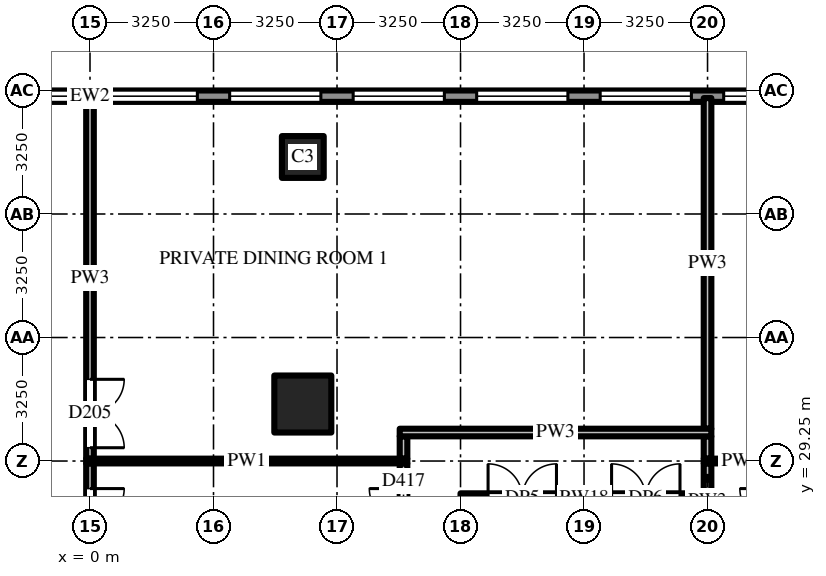
"""IFC4 building model, lengths in metres.
Left out: names, types, materials, properties, quantities, classifications, styles, units other than length and angle.
Written with IfcOpenShell. Run it as: python <this file> out.ifc"""

import sys

from ifc_helpers import new_model, si_unit, direction, frame, frame_2d, origin, origin_2d, place, context, subcontext, project, spatial, rectangle, extrude, source, transform, mapped, element, fill, save


model = new_model("IFC4")
c1 = context("Model", 3, precision=1e-05, world=origin(), true_north=direction((0.0, 1.0)))
c2 = subcontext(c1, "Body", "Model", "MODEL_VIEW")
j1 = project(units=[si_unit("LENGTHUNIT", "METRE"), si_unit("PLANEANGLEUNIT", "RADIAN")], contexts=[c1])
p1 = place(None, origin())
s1 = spatial("IfcSite", under=j1, at=p1, CompositionType="ELEMENT")
p2 = place(p1, origin())
s2 = spatial("IfcBuilding", under=s1, at=p2, CompositionType="ELEMENT")
p3 = place(p2, frame((0.0, 0.0, 19.0)))
s3 = spatial("IfcBuildingStorey", under=s2, at=p3, CompositionType="ELEMENT", Elevation=19.0)
m1 = source(origin(), c2, "Body", "SweptSolid", [
    extrude(rectangle(XDim=1.5, YDim=1.5, at=origin_2d()), origin(), (0.0, 0.0, 1.0), 5.0),
])
p4 = place(p3, frame((5.6, 30.75, 0.0), z_axis=(0.0, 0.0, 1.0), x_axis=(1.0, 0.0, 0.0)))
e1 = element("IfcColumn", 1, at=p4, inside=s3, PredefinedType="COLUMN", context=c2, shape_type="MappedRepresentation", body=[
    mapped(m1, transform((0.0, 0.0, 0.0))),
])
m2 = source(origin(), c2, "Body", "SweptSolid", [
    extrude(rectangle(XDim=1.1, YDim=1.1, at=origin_2d()), origin(), (0.0, 0.0, 1.0), 5.0),
])
p5 = place(p3, frame((5.6, 37.25, 0.0), z_axis=(0.0, 0.0, 1.0), x_axis=(1.0, 0.0, 0.0)))
e2 = element("IfcColumn", 2, at=p5, inside=s3, PredefinedType="COLUMN", context=c2, shape_type="MappedRepresentation", body=[
    mapped(m2, transform((0.0, 0.0, 0.0))),
])
m3 = source(origin(), c2, "Body", "SweptSolid", [
    extrude(rectangle(XDim=6.5, YDim=0.25, at=frame_2d((3.25, 0.0))), origin(), (0.0, 0.0, 1.0), 4.7),
])
p6 = place(p3, frame((9.75, 28.275, 0.0), z_axis=(0.0, 0.0, 1.0), x_axis=(1.0, 0.0, 0.0)))
e3 = element("IfcWall", 3, at=p6, inside=s3, PredefinedType="SHEAR", context=c2, shape_type="MappedRepresentation", body=[
    mapped(m3, transform((0.0, 0.0, 0.0))),
])
m4 = source(origin(), c2, "Body", "SweptSolid", [
    extrude(rectangle(XDim=1.8, YDim=2.1, at=frame_2d((0.9, 1.05))), frame((0.0, 0.135, 0.0), z_axis=(0.0, -1.0, 0.0), x_axis=(1.0, 0.0, 0.0)), (0.0, 0.0, 1.0), 0.27),
])
p7 = place(p6, frame((0.725, 0.0, 0.0)))
e4 = element("IfcOpeningElement", 4, at=p7, cuts=e3, PredefinedType="OPENING", context=c2, shape_type="MappedRepresentation", body=[
    mapped(m4, transform((0.0, 0.0, 0.0))),
])
p8 = place(p6, frame((3.975, 0.0, 0.0)))
e5 = element("IfcOpeningElement", 5, at=p8, cuts=e3, PredefinedType="OPENING", context=c2, shape_type="MappedRepresentation", body=[
    mapped(m4, transform((0.0, 0.0, 0.0))),
])
m5 = source(origin(), c2, "Body", "SweptSolid", [
    extrude(rectangle(XDim=71.5, YDim=0.3, at=frame_2d((35.75, 0.0))), origin(), (0.0, 0.0, 1.0), 4.7),
])
p9 = place(p3, frame((35.75, 38.85, 0.0), z_axis=(0.0, 0.0, 1.0), x_axis=(-1.0, 0.0, 0.0)))
e6 = element("IfcWall", 6, at=p9, inside=s3, PredefinedType="SOLIDWALL", context=c2, shape_type="MappedRepresentation", body=[
    mapped(m5, transform((0.0, 0.0, 0.0))),
])
m6 = source(origin(), c2, "Body", "SweptSolid", [
    extrude(rectangle(XDim=2.4, YDim=3.0, at=frame_2d((1.2, 1.5))), frame((0.0, 0.16, 0.0), z_axis=(0.0, -1.0, 0.0), x_axis=(1.0, 0.0, 0.0)), (0.0, 0.0, 1.0), 0.32),
])
p10 = place(p9, frame((0.425, 0.0, 0.9)))
e7 = element("IfcOpeningElement", 7, at=p10, cuts=e6, PredefinedType="OPENING", context=c2, shape_type="MappedRepresentation", body=[
    mapped(m6, transform((0.0, 0.0, 0.0))),
])
p11 = place(p9, frame((3.675, 0.0, 0.9)))
e8 = element("IfcOpeningElement", 8, at=p11, cuts=e6, PredefinedType="OPENING", context=c2, shape_type="MappedRepresentation", body=[
    mapped(m6, transform((0.0, 0.0, 0.0))),
])
p12 = place(p9, frame((6.925, 0.0, 0.9)))
e9 = element("IfcOpeningElement", 9, at=p12, cuts=e6, PredefinedType="OPENING", context=c2, shape_type="MappedRepresentation", body=[
    mapped(m6, transform((0.0, 0.0, 0.0))),
])
p13 = place(p9, frame((10.175, 0.0, 0.9)))
e10 = element("IfcOpeningElement", 10, at=p13, cuts=e6, PredefinedType="OPENING", context=c2, shape_type="MappedRepresentation", body=[
    mapped(m6, transform((0.0, 0.0, 0.0))),
])
p14 = place(p9, frame((13.425, 0.0, 0.9)))
e11 = element("IfcOpeningElement", 11, at=p14, cuts=e6, PredefinedType="OPENING", context=c2, shape_type="MappedRepresentation", body=[
    mapped(m6, transform((0.0, 0.0, 0.0))),
])
p15 = place(p9, frame((16.675, 0.0, 0.9)))
e12 = element("IfcOpeningElement", 12, at=p15, cuts=e6, PredefinedType="OPENING", context=c2, shape_type="MappedRepresentation", body=[
    mapped(m6, transform((0.0, 0.0, 0.0))),
])
p16 = place(p9, frame((19.925, 0.0, 0.9)))
e13 = element("IfcOpeningElement", 13, at=p16, cuts=e6, PredefinedType="OPENING", context=c2, shape_type="MappedRepresentation", body=[
    mapped(m6, transform((0.0, 0.0, 0.0))),
])
p17 = place(p9, frame((23.175, 0.0, 0.9)))
e14 = element("IfcOpeningElement", 14, at=p17, cuts=e6, PredefinedType="OPENING", context=c2, shape_type="MappedRepresentation", body=[
    mapped(m6, transform((0.0, 0.0, 0.0))),
])
p18 = place(p9, frame((26.425, 0.0, 0.9)))
e15 = element("IfcOpeningElement", 15, at=p18, cuts=e6, PredefinedType="OPENING", context=c2, shape_type="MappedRepresentation", body=[
    mapped(m6, transform((0.0, 0.0, 0.0))),
])
p19 = place(p9, frame((29.675, 0.0, 0.9)))
e16 = element("IfcOpeningElement", 16, at=p19, cuts=e6, PredefinedType="OPENING", context=c2, shape_type="MappedRepresentation", body=[
    mapped(m6, transform((0.0, 0.0, 0.0))),
])
p20 = place(p9, frame((32.925, 0.0, 0.9)))
e17 = element("IfcOpeningElement", 17, at=p20, cuts=e6, PredefinedType="OPENING", context=c2, shape_type="MappedRepresentation", body=[
    mapped(m6, transform((0.0, 0.0, 0.0))),
])
p21 = place(p9, frame((36.175, 0.0, 0.9)))
e18 = element("IfcOpeningElement", 18, at=p21, cuts=e6, PredefinedType="OPENING", context=c2, shape_type="MappedRepresentation", body=[
    mapped(m6, transform((0.0, 0.0, 0.0))),
])
p22 = place(p9, frame((39.425, 0.0, 0.9)))
e19 = element("IfcOpeningElement", 19, at=p22, cuts=e6, PredefinedType="OPENING", context=c2, shape_type="MappedRepresentation", body=[
    mapped(m6, transform((0.0, 0.0, 0.0))),
])
p23 = place(p9, frame((42.675, 0.0, 0.9)))
e20 = element("IfcOpeningElement", 20, at=p23, cuts=e6, PredefinedType="OPENING", context=c2, shape_type="MappedRepresentation", body=[
    mapped(m6, transform((0.0, 0.0, 0.0))),
])
p24 = place(p9, frame((45.925, 0.0, 0.9)))
e21 = element("IfcOpeningElement", 21, at=p24, cuts=e6, PredefinedType="OPENING", context=c2, shape_type="MappedRepresentation", body=[
    mapped(m6, transform((0.0, 0.0, 0.0))),
])
p25 = place(p9, frame((49.175, 0.0, 0.9)))
e22 = element("IfcOpeningElement", 22, at=p25, cuts=e6, PredefinedType="OPENING", context=c2, shape_type="MappedRepresentation", body=[
    mapped(m6, transform((0.0, 0.0, 0.0))),
])
p26 = place(p9, frame((52.425, 0.0, 0.9)))
e23 = element("IfcOpeningElement", 23, at=p26, cuts=e6, PredefinedType="OPENING", context=c2, shape_type="MappedRepresentation", body=[
    mapped(m6, transform((0.0, 0.0, 0.0))),
])
p27 = place(p9, frame((55.675, 0.0, 0.9)))
e24 = element("IfcOpeningElement", 24, at=p27, cuts=e6, PredefinedType="OPENING", context=c2, shape_type="MappedRepresentation", body=[
    mapped(m6, transform((0.0, 0.0, 0.0))),
])
p28 = place(p9, frame((58.925, 0.0, 0.9)))
e25 = element("IfcOpeningElement", 25, at=p28, cuts=e6, PredefinedType="OPENING", context=c2, shape_type="MappedRepresentation", body=[
    mapped(m6, transform((0.0, 0.0, 0.0))),
])
p29 = place(p9, frame((62.175, 0.0, 0.9)))
e26 = element("IfcOpeningElement", 26, at=p29, cuts=e6, PredefinedType="OPENING", context=c2, shape_type="MappedRepresentation", body=[
    mapped(m6, transform((0.0, 0.0, 0.0))),
])
p30 = place(p9, frame((65.425, 0.0, 0.9)))
e27 = element("IfcOpeningElement", 27, at=p30, cuts=e6, PredefinedType="OPENING", context=c2, shape_type="MappedRepresentation", body=[
    mapped(m6, transform((0.0, 0.0, 0.0))),
])
p31 = place(p9, frame((68.675, 0.0, 0.9)))
e28 = element("IfcOpeningElement", 28, at=p31, cuts=e6, PredefinedType="OPENING", context=c2, shape_type="MappedRepresentation", body=[
    mapped(m6, transform((0.0, 0.0, 0.0))),
])
m7 = source(origin(), c2, "Body", "SweptSolid", [
    extrude(rectangle(XDim=3.188, YDim=0.2, at=frame_2d((1.594, 0.0))), origin(), (0.0, 0.0, 1.0), 3.996),
])
p32 = place(p3, frame((0.0, 29.188, 0.0), z_axis=(0.0, 0.0, 1.0), x_axis=(0.0, -1.0, 0.0)))
e29 = element("IfcWall", 29, at=p32, inside=s3, PredefinedType="PARTITIONING", context=c2, shape_type="MappedRepresentation", body=[
    mapped(m7, transform((0.0, 0.0, 0.0))),
])
m8 = source(origin(), c2, "Body", "SweptSolid", [
    extrude(rectangle(XDim=1.8, YDim=2.1, at=frame_2d((0.9, 1.05))), frame((0.0, 0.11, 0.0), z_axis=(0.0, -1.0, 0.0), x_axis=(1.0, 0.0, 0.0)), (0.0, 0.0, 1.0), 0.22),
])
p33 = place(p32, frame((0.663, 0.0, 0.0)))
e30 = element("IfcOpeningElement", 30, at=p33, cuts=e29, PredefinedType="OPENING", context=c2, shape_type="MappedRepresentation", body=[
    mapped(m8, transform((0.0, 0.0, 0.0))),
])
m9 = source(origin(), c2, "Body", "SweptSolid", [
    extrude(rectangle(XDim=9.488, YDim=0.2, at=frame_2d((4.744, 0.0))), origin(), (0.0, 0.0, 1.0), 3.918),
])
p34 = place(p3, frame((0.0, 38.8, 0.0), z_axis=(0.0, 0.0, 1.0), x_axis=(0.0, -1.0, 0.0)))
e31 = element("IfcWall", 31, at=p34, inside=s3, PredefinedType="PARTITIONING", context=c2, shape_type="MappedRepresentation", body=[
    mapped(m9, transform((0.0, 0.0, 0.0))),
])
p35 = place(p34, frame((7.4, 0.0, 0.0)))
e32 = element("IfcOpeningElement", 32, at=p35, cuts=e31, PredefinedType="OPENING", context=c2, shape_type="MappedRepresentation", body=[
    mapped(m8, transform((0.0, 0.0, 0.0))),
])
m10 = source(origin(), c2, "Body", "SweptSolid", [
    extrude(rectangle(XDim=3.087, YDim=0.2, at=frame_2d((1.544, 0.0))), origin(), (0.0, 0.0, 1.0), 4.274),
])
p36 = place(p3, frame((8.25, 26.1, 0.0), z_axis=(0.0, 0.0, 1.0), x_axis=(0.0, 1.0, 0.0)))
e33 = element("IfcWall", 33, at=p36, inside=s3, PredefinedType="PARTITIONING", context=c2, shape_type="MappedRepresentation", body=[
    mapped(m10, transform((0.0, 0.0, 0.0))),
])
p37 = place(p36, frame((0.625, 0.0, 0.0)))
e34 = element("IfcOpeningElement", 34, at=p37, cuts=e33, PredefinedType="OPENING", context=c2, shape_type="MappedRepresentation", body=[
    mapped(m8, transform((0.0, 0.0, 0.0))),
])
m11 = source(origin(), c2, "Body", "SweptSolid", [
    extrude(rectangle(XDim=0.587, YDim=0.2, at=frame_2d((0.294, 0.0))), origin(), (0.0, 0.0, 1.0), 4.7),
])
p38 = place(p3, frame((8.25, 29.312, 0.0), z_axis=(0.0, 0.0, 1.0), x_axis=(0.0, 1.0, 0.0)))
e35 = element("IfcWall", 35, at=p38, inside=s3, PredefinedType="PARTITIONING", context=c2, shape_type="MappedRepresentation", body=[
    mapped(m11, transform((0.0, 0.0, 0.0))),
])
m12 = source(origin(), c2, "Body", "SweptSolid", [
    extrude(rectangle(XDim=0.788, YDim=0.2, at=frame_2d((0.394, 0.0))), origin(), (0.0, 0.0, 1.0), 4.7),
])
p39 = place(p3, frame((16.25, 28.4, 0.0), z_axis=(0.0, 0.0, 1.0), x_axis=(0.0, 1.0, 0.0)))
e36 = element("IfcWall", 36, at=p39, inside=s3, PredefinedType="PARTITIONING", context=c2, shape_type="MappedRepresentation", body=[
    mapped(m12, transform((0.0, 0.0, 0.0))),
])
m13 = source(origin(), c2, "Body", "SweptSolid", [
    extrude(rectangle(XDim=8.7, YDim=0.2, at=frame_2d((4.35, 0.0))), origin(), (0.0, 0.0, 1.0), 3.762),
])
p40 = place(p3, frame((16.25, 30.1, 0.0), z_axis=(0.0, 0.0, 1.0), x_axis=(0.0, 1.0, 0.0)))
e37 = element("IfcWall", 37, at=p40, inside=s3, PredefinedType="PARTITIONING", context=c2, shape_type="MappedRepresentation", body=[
    mapped(m13, transform((0.0, 0.0, 0.0))),
])
p41 = place(p3, frame((16.25, 29.9, 0.0), z_axis=(0.0, 0.0, 1.0), x_axis=(0.0, -1.0, 0.0)))
e38 = element("IfcWall", 38, at=p41, inside=s3, PredefinedType="PARTITIONING", context=c2, shape_type="MappedRepresentation", body=[
    mapped(m11, transform((0.0, 0.0, 0.0))),
])
m14 = source(origin(), c2, "Body", "SweptSolid", [
    extrude(rectangle(XDim=8.45, YDim=0.125, at=frame_2d((4.225, 0.0))), origin(), (0.0, 0.0, 1.0), 3.762),
])
p42 = place(p3, frame((-0.1, 29.25, 0.0), z_axis=(0.0, 0.0, 1.0), x_axis=(1.0, 0.0, 0.0)))
e39 = element("IfcWall", 39, at=p42, inside=s3, PredefinedType="PARTITIONING", context=c2, shape_type="MappedRepresentation", body=[
    mapped(m14, transform((0.0, 0.0, 0.0))),
])
m15 = source(origin(), c2, "Body", "SweptSolid", [
    extrude(rectangle(XDim=1.95, YDim=0.125, at=frame_2d((0.975, 0.0))), origin(), (0.0, 0.0, 1.0), 4.7),
])
p43 = place(p3, frame((16.15, 29.25, 0.0), z_axis=(0.0, 0.0, 1.0), x_axis=(1.0, 0.0, 0.0)))
e40 = element("IfcWall", 40, at=p43, inside=s3, PredefinedType="PARTITIONING", context=c2, shape_type="MappedRepresentation", body=[
    mapped(m15, transform((0.0, 0.0, 0.0))),
])
m16 = source(origin(), c2, "Body", "SweptSolid", [
    extrude(rectangle(XDim=8.2, YDim=0.2, at=frame_2d((4.1, 0.0))), origin(), (0.0, 0.0, 1.0), 4.7),
])
p44 = place(p3, frame((8.15, 30.0, 0.0), z_axis=(0.0, 0.0, 1.0), x_axis=(1.0, 0.0, 0.0)))
e41 = element("IfcWall", 41, at=p44, inside=s3, PredefinedType="PARTITIONING", context=c2, shape_type="MappedRepresentation", body=[
    mapped(m16, transform((0.0, 0.0, 0.0))),
])
m17 = source(origin(), c2, "Body", "SweptSolid", [
    extrude(rectangle(XDim=2.4, YDim=3.0, at=frame_2d((1.2, 1.5))), frame((0.0, 0.03, 0.0), z_axis=(0.0, -1.0, 0.0), x_axis=(1.0, 0.0, 0.0)), (0.0, 0.0, 1.0), 0.06),
])
p45 = place(p15, origin())
e42 = element("IfcWindow", 42, at=p45, inside=s3, PartitioningType="SINGLE_PANEL", PredefinedType="WINDOW", context=c2, shape_type="MappedRepresentation", body=[
    mapped(m17, transform((0.0, 0.0, 0.0))),
])
fill(e12, e42)
p46 = place(p16, origin())
e43 = element("IfcWindow", 43, at=p46, inside=s3, PartitioningType="SINGLE_PANEL", PredefinedType="WINDOW", context=c2, shape_type="MappedRepresentation", body=[
    mapped(m17, transform((0.0, 0.0, 0.0))),
])
fill(e13, e43)
p47 = place(p17, origin())
e44 = element("IfcWindow", 44, at=p47, inside=s3, PartitioningType="SINGLE_PANEL", PredefinedType="WINDOW", context=c2, shape_type="MappedRepresentation", body=[
    mapped(m17, transform((0.0, 0.0, 0.0))),
])
fill(e14, e44)
p48 = place(p18, origin())
e45 = element("IfcWindow", 45, at=p48, inside=s3, PartitioningType="SINGLE_PANEL", PredefinedType="WINDOW", context=c2, shape_type="MappedRepresentation", body=[
    mapped(m17, transform((0.0, 0.0, 0.0))),
])
fill(e15, e45)
p49 = place(p19, origin())
e46 = element("IfcWindow", 46, at=p49, inside=s3, PartitioningType="SINGLE_PANEL", PredefinedType="WINDOW", context=c2, shape_type="MappedRepresentation", body=[
    mapped(m17, transform((0.0, 0.0, 0.0))),
])
fill(e16, e46)
p50 = place(p20, origin())
e47 = element("IfcWindow", 47, at=p50, inside=s3, PartitioningType="SINGLE_PANEL", PredefinedType="WINDOW", context=c2, shape_type="MappedRepresentation", body=[
    mapped(m17, transform((0.0, 0.0, 0.0))),
])
fill(e17, e47)
p51 = place(p21, origin())
e48 = element("IfcWindow", 48, at=p51, inside=s3, PartitioningType="SINGLE_PANEL", PredefinedType="WINDOW", context=c2, shape_type="MappedRepresentation", body=[
    mapped(m17, transform((0.0, 0.0, 0.0))),
])
fill(e18, e48)
m18 = source(origin(), c2, "Body", "SweptSolid", [
    extrude(rectangle(XDim=1.8, YDim=2.1, at=frame_2d((0.9, 1.05))), frame((0.0, 0.025, 0.0), z_axis=(0.0, -1.0, 0.0), x_axis=(1.0, 0.0, 0.0)), (0.0, 0.0, 1.0), 0.05),
])
p52 = place(p33, origin())
e49 = element("IfcDoor", 49, at=p52, inside=s3, OperationType="DOUBLE_DOOR_SINGLE_SWING", PredefinedType="DOOR", context=c2, shape_type="MappedRepresentation", body=[
    mapped(m18, transform((0.0, 0.0, 0.0))),
])
fill(e30, e49)
p53 = place(p37, origin())
e50 = element("IfcDoor", 50, at=p53, inside=s3, OperationType="DOUBLE_DOOR_SINGLE_SWING", PredefinedType="DOOR", context=c2, shape_type="MappedRepresentation", body=[
    mapped(m18, transform((0.0, 0.0, 0.0))),
])
fill(e34, e50)
p54 = place(p35, origin())
e51 = element("IfcDoor", 51, at=p54, inside=s3, OperationType="DOUBLE_DOOR_SINGLE_SWING", PredefinedType="DOOR", context=c2, shape_type="MappedRepresentation", body=[
    mapped(m18, transform((0.0, 0.0, 0.0))),
])
fill(e32, e51)
save(model, sys.argv[1])
